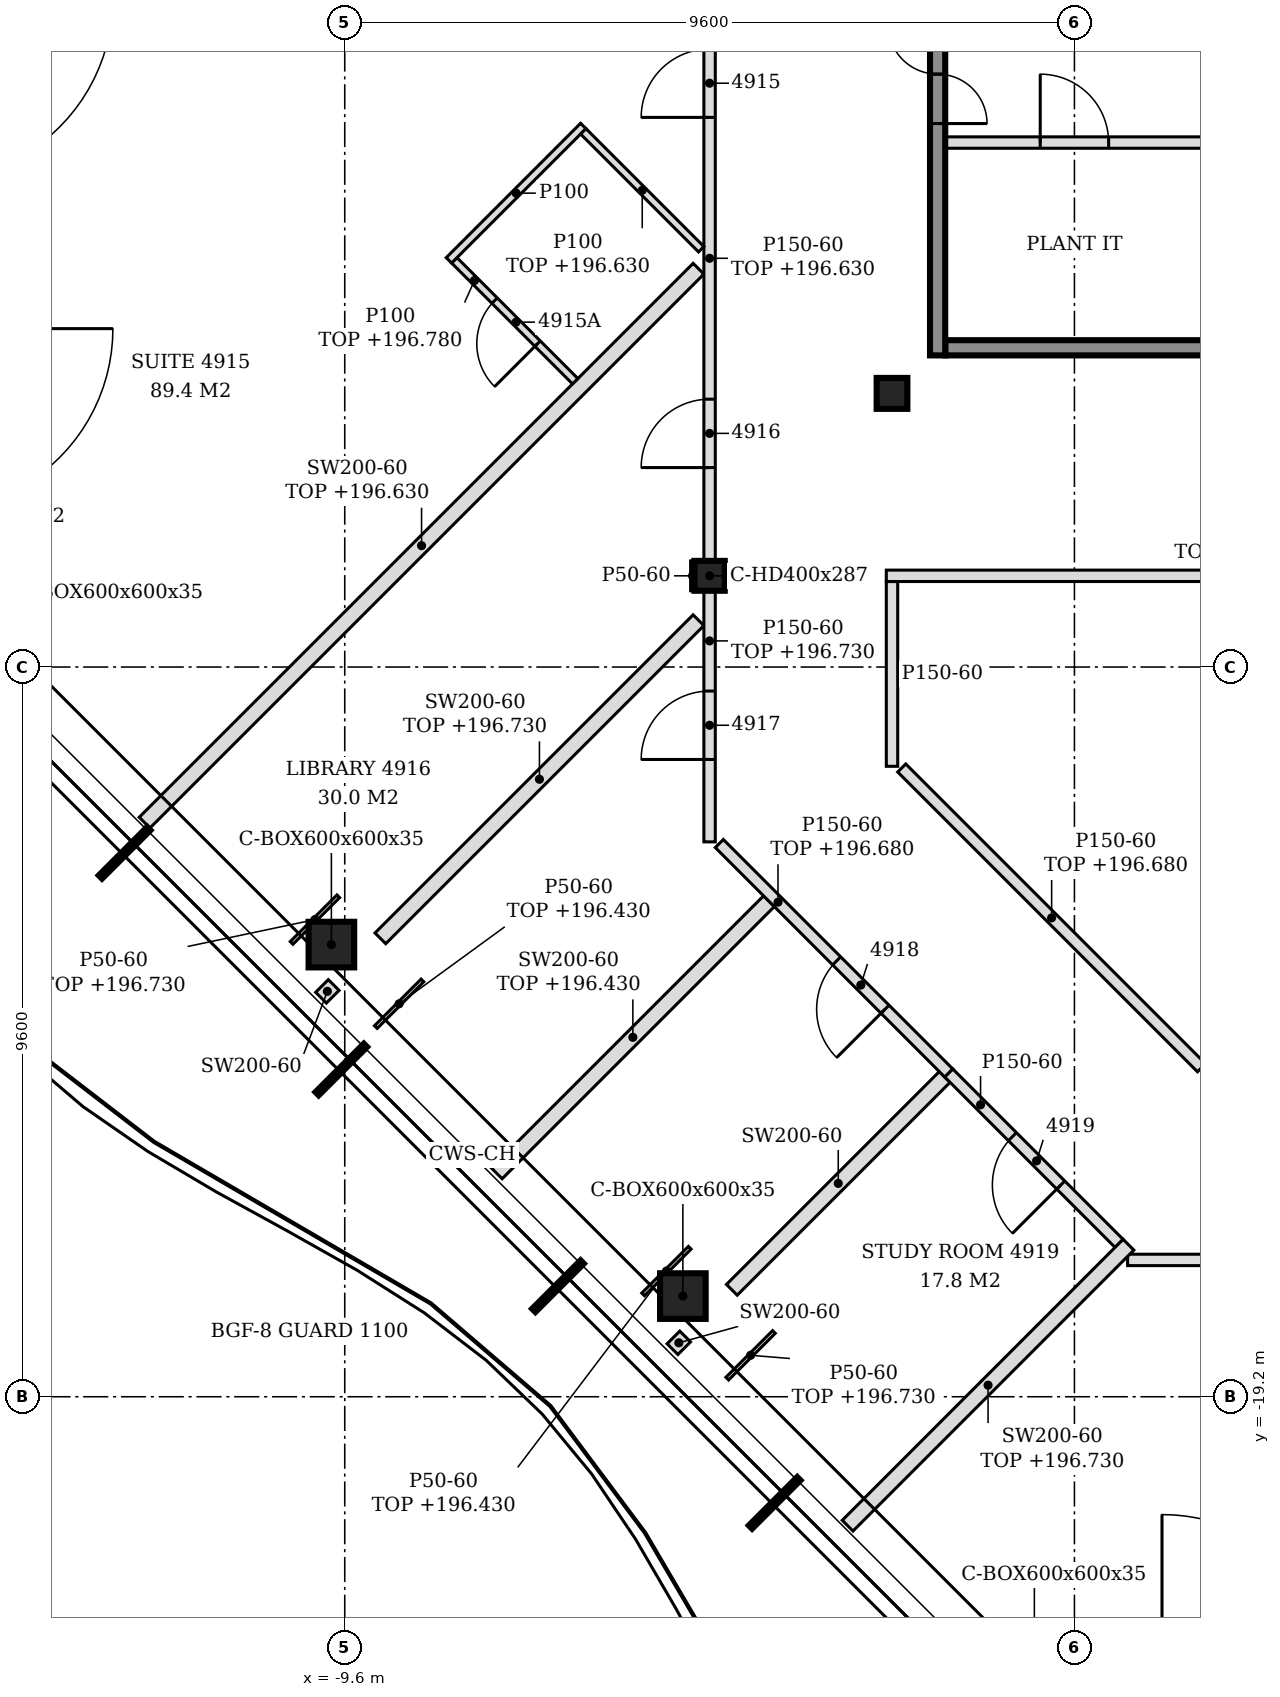
"""IFC4 building model, lengths in metres.
Left out: names, types, materials, properties, quantities, classifications, styles, units other than length and angle.
Written with IfcOpenShell. Run it as: python <this file> out.ifc"""

import sys

from ifc_helpers import new_model, si_unit, direction, frame, frame_2d, origin, origin_2d, place, context, subcontext, project, spatial, polyline, rectangle, hollow_rectangle, i_section, outline, extrude, clip, halfspace, element, fill, save


model = new_model("IFC4")
c1 = context("Model", 3, precision=1e-05, world=origin(), true_north=direction((0.0, 1.0)))
c2 = subcontext(c1, "Body", "Model", "MODEL_VIEW")
j1 = project(units=[si_unit("LENGTHUNIT", "METRE"), si_unit("PLANEANGLEUNIT", "RADIAN")], contexts=[c1])
p1 = place(None, origin())
s1 = spatial("IfcSite", under=j1, at=p1, CompositionType="ELEMENT")
p2 = place(p1, origin())
s2 = spatial("IfcBuilding", under=s1, at=p2, CompositionType="ELEMENT")
p3 = place(p2, frame((0.0, 0.0, 193.8)))
s3 = spatial("IfcBuildingStorey", under=s2, at=p3, CompositionType="ELEMENT", Elevation=193.8)
for number, where, z_axis, x_axis in (
    (1, (-0.527, -22.5, -0.15), (0.183, -0.122, 0.976), (0.555, 0.832, 0.0)),
    (2, (-14.4, -8.627, -0.15), (0.183, -0.122, 0.976), (0.555, 0.832, 0.0)),
):
    element("IfcColumn", number, at=place(p3, frame(where, z_axis=z_axis, x_axis=x_axis)), inside=s3, PredefinedType="COLUMN", context=c2, shape_type="Clipping", body=[
        clip(clip(extrude(hollow_rectangle(XDim=0.6, YDim=0.6, WallThickness=0.035, at=origin_2d()), origin(), (0.0, 0.0, 1.0), 3.69), halfspace(frame((0.0, 0.0, 0.021), z_axis=(0.0, 0.0, 1.0), x_axis=(1.0, 0.0, 0.0)), True)), halfspace(frame((0.0, 0.0, 3.668), z_axis=(0.0, 0.0, 1.0), x_axis=(1.0, 0.0, 0.0)), False)),
    ])
for number, where, z_axis, x_axis in (
    (3, (-9.776, -13.251, -0.15), (0.183, -0.122, 0.976), (0.555, 0.832, 0.0)),
    (4, (-5.152, -17.876, -0.15), (0.183, -0.122, 0.976), (0.555, 0.832, 0.0)),
):
    element("IfcColumn", number, at=place(p3, frame(where, z_axis=z_axis, x_axis=x_axis)), inside=s3, PredefinedType="COLUMN", context=c2, shape_type="Clipping", body=[
        clip(clip(extrude(hollow_rectangle(XDim=0.6, YDim=0.6, WallThickness=0.035, at=origin_2d()), origin(), (0.0, 0.0, 1.0), 3.69), halfspace(frame((0.0, 0.0, 0.021), z_axis=(0.0, 0.0, 1.0), x_axis=(1.0, 0.0, 0.0)), True)), halfspace(frame((0.0, 0.0, 3.668), z_axis=(0.0, 0.0, 1.0), x_axis=(1.0, 0.0, 0.0)), False)),
    ])
p4 = place(p3, frame((-4.8, -8.4, -0.15), z_axis=(0.0, 0.0, 1.0), x_axis=(1.0, 0.0, 0.0)))
e5 = element("IfcColumn", 5, at=p4, inside=s3, PredefinedType="COLUMN", context=c2, shape_type="SweptSolid", body=[
    extrude(i_section(OverallWidth=0.399, OverallDepth=0.393, WebThickness=0.023, FlangeThickness=0.037, FilletRadius=0.015, at=origin_2d()), origin(), (0.0, 0.0, 1.0), 3.6),
])
p5 = place(p3, frame((-2.4, -6.0, -0.15), z_axis=(0.0, 0.0, 1.0), x_axis=(1.0, 0.0, 0.0)))
e6 = element("IfcColumn", 6, at=p5, inside=s3, PredefinedType="COLUMN", context=c2, shape_type="SweptSolid", body=[
    extrude(i_section(OverallWidth=0.404, OverallDepth=0.407, WebThickness=0.027, FlangeThickness=0.044, FilletRadius=0.015, at=origin_2d()), origin(), (0.0, 0.0, 1.0), 3.6),
])
p6 = place(p3, frame((-1.7, -5.4, 0.0), z_axis=(0.0, 0.0, 1.0), x_axis=(1.0, 0.0, 0.0)))
e7 = element("IfcWall", 7, at=p6, inside=s3, PredefinedType="SOLIDWALL", context=c2, shape_type="SweptSolid", body=[
    extrude(rectangle(XDim=7.9, YDim=0.2, at=frame_2d((3.95, 0.0))), origin(), (0.0, 0.0, 1.0), 3.45),
])
p7 = place(p3, frame((-1.7, -2.7, 0.0), z_axis=(0.0, 0.0, 1.0), x_axis=(1.0, 0.0, 0.0)))
e8 = element("IfcWall", 8, at=p7, inside=s3, PredefinedType="PARTITIONING", context=c2, shape_type="SweptSolid", body=[
    extrude(rectangle(XDim=7.825, YDim=0.15, at=frame_2d((3.913, 0.0))), origin(), (0.0, 0.0, 1.0), 3.45),
])
p8 = place(p7, frame((1.25, 0.0, 0.0)))
e9 = element("IfcOpeningElement", 9, at=p8, cuts=e8, PredefinedType="OPENING", context=c2, shape_type="SweptSolid", body=[
    extrude(rectangle(XDim=0.9, YDim=2.1, at=frame_2d((0.45, 1.05))), frame((0.0, 0.085, 0.0), z_axis=(0.0, -1.0, 0.0), x_axis=(1.0, 0.0, 0.0)), (0.0, 0.0, 1.0), 0.17),
])
p9 = place(p7, frame((5.25, 0.0, 0.0)))
e10 = element("IfcOpeningElement", 10, at=p9, cuts=e8, PredefinedType="OPENING", context=c2, shape_type="SweptSolid", body=[
    extrude(rectangle(XDim=0.9, YDim=2.1, at=frame_2d((0.45, 1.05))), frame((0.0, 0.085, 0.0), z_axis=(0.0, -1.0, 0.0), x_axis=(1.0, 0.0, 0.0)), (0.0, 0.0, 1.0), 0.17),
])
p10 = place(p3, frame((-1.8, -5.5, 0.0), z_axis=(0.0, 0.0, 1.0), x_axis=(0.0, 1.0, 0.0)))
e11 = element("IfcWall", 11, at=p10, inside=s3, PredefinedType="SOLIDWALL", context=c2, shape_type="SweptSolid", body=[
    extrude(rectangle(XDim=15.8, YDim=0.2, at=frame_2d((7.9, 0.0))), origin(), (0.0, 0.0, 1.0), 3.45),
])
p11 = place(p10, frame((3.05, 0.0, 0.0)))
e12 = element("IfcOpeningElement", 12, at=p11, cuts=e11, PredefinedType="OPENING", context=c2, shape_type="SweptSolid", body=[
    extrude(rectangle(XDim=1.3, YDim=2.1, at=frame_2d((0.65, 1.05))), frame((0.0, 0.11, 0.0), z_axis=(0.0, -1.0, 0.0), x_axis=(1.0, 0.0, 0.0)), (0.0, 0.0, 1.0), 0.22),
])
p12 = place(p10, frame((11.45, 0.0, 0.0)))
e13 = element("IfcOpeningElement", 13, at=p12, cuts=e11, PredefinedType="OPENING", context=c2, shape_type="SweptSolid", body=[
    extrude(rectangle(XDim=1.3, YDim=2.1, at=frame_2d((0.65, 1.05))), frame((0.0, 0.11, 0.0), z_axis=(0.0, -1.0, 0.0), x_axis=(1.0, 0.0, 0.0)), (0.0, 0.0, 1.0), 0.22),
])
p13 = place(p3, frame((-2.984, -20.896, 0.0), z_axis=(0.0, 0.0, 1.0), x_axis=(0.707013347416, 0.707200202612, 0.0)))
e14 = element("IfcWall", 14, at=p13, inside=s3, PredefinedType="PARTITIONING", context=c2, shape_type="SweptSolid", body=[
    extrude(rectangle(XDim=5.226, YDim=0.2, at=frame_2d((2.613, 0.0))), origin(), (0.0, 0.0, 1.0), 2.93),
])
p14 = place(p3, frame((-5.288, -18.574, 0.0), z_axis=(0.0, 0.0, 1.0), x_axis=(0.707106781187, 0.707106781187, 0.0)))
e15 = element("IfcWall", 15, at=p14, inside=s3, PredefinedType="PARTITIONING", context=c2, shape_type="SweptSolid", body=[
    extrude(rectangle(XDim=0.235, YDim=0.2, at=frame_2d((0.118, 0.0))), origin(), (0.0, 0.0, 1.0), 3.45),
])
p15 = place(p3, frame((-4.507, -17.793, 0.0), z_axis=(0.0, 0.0, 1.0), x_axis=(0.707106781187, 0.707106781187, 0.0)))
e16 = element("IfcWall", 16, at=p15, inside=s3, PredefinedType="PARTITIONING", context=c2, shape_type="SweptSolid", body=[
    extrude(rectangle(XDim=3.96, YDim=0.2, at=frame_2d((1.98, 0.0))), origin(), (0.0, 0.0, 1.0), 3.45),
])
p16 = place(p3, frame((0.699, -17.4, 0.0), z_axis=(0.0, 0.0, 1.0), x_axis=(1.0, 0.0, 0.0)))
e17 = element("IfcWall", 17, at=p16, inside=s3, PredefinedType="PARTITIONING", context=c2, shape_type="SweptSolid", body=[
    extrude(outline(polyline([(0.0, 0.0), (24.822, 0.0), (24.822, 3.45), (18.651, 3.45), (18.649, 2.73), (18.351, 2.73), (18.349, 3.45), (6.651, 3.45), (6.649, 2.73), (6.351, 2.73), (6.349, 3.45), (0.0, 3.45), (0.0, 0.0)])), frame((0.0, 0.075, 0.0), z_axis=(0.0, -1.0, 0.0), x_axis=(1.0, 0.0, 0.0)), (0.0, 0.0, 1.0), 0.15),
])
p17 = place(p16, frame((11.188, 0.0, 0.0)))
e18 = element("IfcOpeningElement", 18, at=p17, cuts=e17, PredefinedType="OPENING", context=c2, shape_type="SweptSolid", body=[
    extrude(rectangle(XDim=0.9, YDim=2.1, at=frame_2d((0.45, 1.05))), frame((0.0, 0.085, 0.0), z_axis=(0.0, -1.0, 0.0), x_axis=(1.0, 0.0, 0.0)), (0.0, 0.0, 1.0), 0.17),
])
p18 = place(p16, frame((2.635, 0.0, 0.0)))
e19 = element("IfcOpeningElement", 19, at=p18, cuts=e17, PredefinedType="OPENING", context=c2, shape_type="SweptSolid", body=[
    extrude(rectangle(XDim=0.9, YDim=2.1, at=frame_2d((0.45, 1.05))), frame((0.0, 0.085, 0.0), z_axis=(0.0, -1.0, 0.0), x_axis=(1.0, 0.0, 0.0)), (0.0, 0.0, 1.0), 0.17),
])
p19 = place(p3, frame((0.587, -17.182, 0.0), z_axis=(0.0, 0.0, 1.0), x_axis=(-0.706952760983, 0.707260767849, 0.0)))
e20 = element("IfcWall", 20, at=p19, inside=s3, PredefinedType="PARTITIONING", context=c2, shape_type="SweptSolid", body=[
    extrude(rectangle(XDim=3.171, YDim=0.15, at=frame_2d((1.585, 0.0))), origin(), (0.0, 0.0, 1.0), 3.45),
])
p20 = place(p19, frame((1.085, 0.0, 0.0)))
e21 = element("IfcOpeningElement", 21, at=p20, cuts=e20, PredefinedType="OPENING", context=c2, shape_type="SweptSolid", body=[
    extrude(rectangle(XDim=0.9, YDim=2.1, at=frame_2d((0.45, 1.05))), frame((0.0, 0.085, 0.0), z_axis=(0.0, -1.0, 0.0), x_axis=(1.0, 0.0, 0.0)), (0.0, 0.0, 1.0), 0.17),
])
p21 = place(p3, frame((-7.6, -16.262, 0.0), z_axis=(0.0, 0.0, 1.0), x_axis=(0.707106781187, 0.707106781187, 0.0)))
e22 = element("IfcWall", 22, at=p21, inside=s3, PredefinedType="PARTITIONING", context=c2, shape_type="SweptSolid", body=[
    extrude(rectangle(XDim=5.064, YDim=0.2, at=frame_2d((2.532, 0.0))), origin(), (0.0, 0.0, 1.0), 2.63),
])
p22 = place(p3, frame((-1.654, -14.94, 0.0), z_axis=(0.0, 0.0, 1.0), x_axis=(-0.707106781187, 0.707106781187, 0.0)))
e23 = element("IfcWall", 23, at=p22, inside=s3, PredefinedType="PARTITIONING", context=c2, shape_type="SweptSolid", body=[
    extrude(rectangle(XDim=4.268, YDim=0.15, at=frame_2d((2.134, 0.0))), origin(), (0.0, 0.0, 1.0), 2.88),
])
p23 = place(p22, frame((1.185, 0.0, 0.0)))
e24 = element("IfcOpeningElement", 24, at=p23, cuts=e23, PredefinedType="OPENING", context=c2, shape_type="SweptSolid", body=[
    extrude(rectangle(XDim=0.9, YDim=2.1, at=frame_2d((0.45, 1.05))), frame((0.0, 0.085, 0.0), z_axis=(0.0, -1.0, 0.0), x_axis=(1.0, 0.0, 0.0)), (0.0, 0.0, 1.0), 0.17),
])
p24 = place(p3, frame((1.672, -14.872, 0.0), z_axis=(0.0, 0.0, 1.0), x_axis=(-0.707106781187, 0.707106781187, 0.0)))
e25 = element("IfcWall", 25, at=p24, inside=s3, PredefinedType="PARTITIONING", context=c2, shape_type="SweptSolid", body=[
    extrude(rectangle(XDim=5.578, YDim=0.15, at=frame_2d((2.789, 0.0))), origin(), (0.0, 0.0, 1.0), 2.88),
])
p25 = place(p3, frame((-9.912, -13.95, 0.0), z_axis=(0.0, 0.0, 1.0), x_axis=(0.707106781187, 0.707106781187, 0.0)))
e26 = element("IfcWall", 26, at=p25, inside=s3, PredefinedType="PARTITIONING", context=c2, shape_type="SweptSolid", body=[
    extrude(rectangle(XDim=0.235, YDim=0.2, at=frame_2d((0.118, 0.0))), origin(), (0.0, 0.0, 1.0), 3.45),
])
p26 = place(p3, frame((-9.131, -13.169, 0.0), z_axis=(0.0, 0.0, 1.0), x_axis=(0.707086158914, 0.707127402857, 0.0)))
e27 = element("IfcWall", 27, at=p26, inside=s3, PredefinedType="PARTITIONING", context=c2, shape_type="SweptSolid", body=[
    extrude(rectangle(XDim=5.919, YDim=0.2, at=frame_2d((2.96, 0.0))), origin(), (0.0, 0.0, 1.0), 2.93),
])
p27 = place(p3, frame((-4.8, -11.9, 0.0), z_axis=(0.0, 0.0, 1.0), x_axis=(0.0, 1.0, 0.0)))
e28 = element("IfcWall", 28, at=p27, inside=s3, PredefinedType="PARTITIONING", context=c2, shape_type="SweptSolid", body=[
    extrude(rectangle(XDim=3.304, YDim=0.15, at=frame_2d((1.652, 0.0))), origin(), (0.0, 0.0, 1.0), 2.93),
])
p28 = place(p27, frame((1.084, 0.0, 0.0)))
e29 = element("IfcOpeningElement", 29, at=p28, cuts=e28, PredefinedType="OPENING", context=c2, shape_type="SweptSolid", body=[
    extrude(rectangle(XDim=0.9, YDim=2.1, at=frame_2d((0.45, 1.05))), frame((0.0, 0.085, 0.0), z_axis=(0.0, -1.0, 0.0), x_axis=(1.0, 0.0, 0.0)), (0.0, 0.0, 1.0), 0.17),
])
p29 = place(p3, frame((-12.233, -11.647, 0.0), z_axis=(0.0, 0.0, 1.0), x_axis=(0.707094936157, 0.707118626017, 0.0)))
e30 = element("IfcWall", 30, at=p29, inside=s3, PredefinedType="PARTITIONING", context=c2, shape_type="SweptSolid", body=[
    extrude(rectangle(XDim=10.306, YDim=0.2, at=frame_2d((5.153, 0.0))), origin(), (0.0, 0.0, 1.0), 2.83),
])
p30 = place(p3, frame((-2.4, -10.906, 0.0), z_axis=(0.0, 0.0, 1.0), x_axis=(0.0, 1.0, 0.0)))
e31 = element("IfcWall", 31, at=p30, inside=s3, PredefinedType="PARTITIONING", context=c2, shape_type="SweptSolid", body=[
    extrude(outline(polyline([(0.0, 0.0), (2.431, 0.0), (2.431, 2.83), (2.356, 2.83), (2.354, 3.45), (0.0, 3.45), (0.0, 0.0)])), frame((0.0, 0.075, 0.0), z_axis=(0.0, -1.0, 0.0), x_axis=(1.0, 0.0, 0.0)), (0.0, 0.0, 1.0), 0.15),
])
p31 = place(p3, frame((-2.475, -8.4, 0.0), z_axis=(0.0, 0.0, 1.0), x_axis=(1.0, 0.0, 0.0)))
e32 = element("IfcWall", 32, at=p31, inside=s3, PredefinedType="PARTITIONING", context=c2, shape_type="SweptSolid", body=[
    extrude(rectangle(XDim=9.476, YDim=0.15, at=frame_2d((4.738, 0.0))), origin(), (0.0, 0.0, 1.0), 2.83),
])
p32 = place(p3, frame((-4.8, -8.204, 0.0), z_axis=(0.0, 0.0, 1.0), x_axis=(0.0, 1.0, 0.0)))
e33 = element("IfcWall", 33, at=p32, inside=s3, PredefinedType="PARTITIONING", context=c2, shape_type="SweptSolid", body=[
    extrude(rectangle(XDim=10.407, YDim=0.15, at=frame_2d((5.204, 0.0))), origin(), (0.0, 0.0, 1.0), 2.83),
])
p33 = place(p32, frame((9.022, 0.0, 0.0)))
e34 = element("IfcOpeningElement", 34, at=p33, cuts=e33, PredefinedType="OPENING", context=c2, shape_type="SweptSolid", body=[
    extrude(rectangle(XDim=0.9, YDim=2.1, at=frame_2d((0.45, 1.05))), frame((0.0, 0.085, 0.0), z_axis=(0.0, -1.0, 0.0), x_axis=(1.0, 0.0, 0.0)), (0.0, 0.0, 1.0), 0.17),
])
p34 = place(p32, frame((5.834, 0.0, 0.0)))
e35 = element("IfcOpeningElement", 35, at=p34, cuts=e33, PredefinedType="OPENING", context=c2, shape_type="SweptSolid", body=[
    extrude(rectangle(XDim=0.9, YDim=2.1, at=frame_2d((0.45, 1.05))), frame((0.0, 0.085, 0.0), z_axis=(0.0, -1.0, 0.0), x_axis=(1.0, 0.0, 0.0)), (0.0, 0.0, 1.0), 0.17),
])
p35 = place(p32, frame((1.228, 0.0, 0.0)))
e36 = element("IfcOpeningElement", 36, at=p35, cuts=e33, PredefinedType="OPENING", context=c2, shape_type="SweptSolid", body=[
    extrude(rectangle(XDim=0.9, YDim=2.1, at=frame_2d((0.45, 1.05))), frame((0.0, 0.085, 0.0), z_axis=(0.0, -1.0, 0.0), x_axis=(1.0, 0.0, 0.0)), (0.0, 0.0, 1.0), 0.17),
])
p36 = place(p3, frame((-6.568, -5.84, 0.0), z_axis=(0.0, 0.0, 1.0), x_axis=(-0.70716103421, 0.707052524, 0.0)))
e37 = element("IfcWall", 37, at=p36, inside=s3, PredefinedType="PARTITIONING", context=c2, shape_type="SweptSolid", body=[
    extrude(rectangle(XDim=2.25, YDim=0.1, at=frame_2d((1.125, 0.0))), origin(), (0.0, 0.0, 1.0), 2.98),
])
p37 = place(p36, frame((0.7, 0.0, 0.0)))
e38 = element("IfcOpeningElement", 38, at=p37, cuts=e37, PredefinedType="OPENING", context=c2, shape_type="SweptSolid", body=[
    extrude(rectangle(XDim=0.8, YDim=2.1, at=frame_2d((0.4, 1.05))), frame((0.0, 0.06, 0.0), z_axis=(0.0, -1.0, 0.0), x_axis=(1.0, 0.0, 0.0)), (0.0, 0.0, 1.0), 0.12),
])
p38 = place(p3, frame((-8.229, -4.25, 0.0), z_axis=(0.0, 0.0, 1.0), x_axis=(0.707106781187, 0.707106781187, 0.0)))
e39 = element("IfcWall", 39, at=p38, inside=s3, PredefinedType="PARTITIONING", context=c2, shape_type="SweptSolid", body=[
    extrude(rectangle(XDim=2.5, YDim=0.1, at=frame_2d((1.25, 0.0))), origin(), (0.0, 0.0, 1.0), 3.45),
])
p39 = place(p3, frame((-4.91, -4.104, 0.0), z_axis=(0.0, 0.0, 1.0), x_axis=(-0.707106781187, 0.707106781187, 0.0)))
e40 = element("IfcWall", 40, at=p39, inside=s3, PredefinedType="PARTITIONING", context=c2, shape_type="SweptSolid", body=[
    extrude(rectangle(XDim=2.194, YDim=0.1, at=frame_2d((1.097, 0.0))), origin(), (0.0, 0.0, 1.0), 2.83),
])
p40 = place(p3, frame((-4.567, -18.961, 0.0), z_axis=(0.0, 0.0, 1.0), x_axis=(0.707106781187, 0.707106781187, 0.0)))
e41 = element("IfcWall", 41, at=p40, inside=s3, PredefinedType="PARTITIONING", context=c2, shape_type="SweptSolid", body=[
    extrude(rectangle(XDim=0.868, YDim=0.05, at=frame_2d((0.434, 0.0))), origin(), (0.0, 0.0, 1.0), 2.93),
])
p41 = place(p3, frame((-5.675, -17.854, 0.0), z_axis=(0.0, 0.0, 1.0), x_axis=(0.707247373047, 0.706966161367, 0.0)))
e42 = element("IfcWall", 42, at=p41, inside=s3, PredefinedType="PARTITIONING", context=c2, shape_type="SweptSolid", body=[
    extrude(rectangle(XDim=0.868, YDim=0.05, at=frame_2d((0.434, 0.0))), origin(), (0.0, 0.0, 1.0), 2.63),
])
p42 = place(p3, frame((-10.299, -13.229, 0.0), z_axis=(0.0, 0.0, 1.0), x_axis=(0.707106781187, 0.707106781187, 0.0)))
e43 = element("IfcWall", 43, at=p42, inside=s3, PredefinedType="PARTITIONING", context=c2, shape_type="SweptSolid", body=[
    extrude(rectangle(XDim=0.868, YDim=0.05, at=frame_2d((0.434, 0.0))), origin(), (0.0, 0.0, 1.0), 2.93),
])
p43 = place(p3, frame((-9.191, -14.337, 0.0), z_axis=(0.0, 0.0, 1.0), x_axis=(0.707247373047, 0.706966161367, 0.0)))
e44 = element("IfcWall", 44, at=p43, inside=s3, PredefinedType="PARTITIONING", context=c2, shape_type="SweptSolid", body=[
    extrude(rectangle(XDim=0.868, YDim=0.05, at=frame_2d((0.434, 0.0))), origin(), (0.0, 0.0, 1.0), 2.63),
])
p44 = place(p3, frame((-5.024, -8.596, 0.0), z_axis=(0.0, 0.0, 1.0), x_axis=(0.0, 1.0, 0.0)))
e45 = element("IfcWall", 45, at=p44, inside=s3, PredefinedType="PARTITIONING", context=c2, shape_type="SweptSolid", body=[
    extrude(rectangle(XDim=0.393, YDim=0.05, at=frame_2d((0.196, 0.0))), origin(), (0.0, 0.0, 1.0), 3.45),
])
p45 = place(p11, origin())
e46 = element("IfcDoor", 46, at=p45, inside=s3, OperationType="DOUBLE_DOOR_SINGLE_SWING", PredefinedType="DOOR", context=c2, shape_type="SweptSolid", body=[
    extrude(rectangle(XDim=1.3, YDim=2.1, at=frame_2d((0.65, 1.05))), frame((0.0, 0.025, 0.0), z_axis=(0.0, -1.0, 0.0), x_axis=(1.0, 0.0, 0.0)), (0.0, 0.0, 1.0), 0.05),
])
fill(e12, e46)
p46 = place(p8, origin())
e47 = element("IfcDoor", 47, at=p46, inside=s3, OperationType="SINGLE_SWING_LEFT", PredefinedType="DOOR", context=c2, shape_type="SweptSolid", body=[
    extrude(rectangle(XDim=0.9, YDim=2.1, at=frame_2d((0.45, 1.05))), frame((0.0, 0.025, 0.0), z_axis=(0.0, -1.0, 0.0), x_axis=(1.0, 0.0, 0.0)), (0.0, 0.0, 1.0), 0.05),
])
fill(e9, e47)
p47 = place(p34, origin())
e48 = element("IfcDoor", 48, at=p47, inside=s3, OperationType="SINGLE_SWING_LEFT", PredefinedType="DOOR", context=c2, shape_type="SweptSolid", body=[
    extrude(rectangle(XDim=0.9, YDim=2.1, at=frame_2d((0.45, 1.05))), frame((0.0, 0.025, 0.0), z_axis=(0.0, -1.0, 0.0), x_axis=(1.0, 0.0, 0.0)), (0.0, 0.0, 1.0), 0.05),
])
fill(e35, e48)
p48 = place(p37, origin())
e49 = element("IfcDoor", 49, at=p48, inside=s3, OperationType="SINGLE_SWING_LEFT", PredefinedType="DOOR", context=c2, shape_type="SweptSolid", body=[
    extrude(rectangle(XDim=0.8, YDim=2.1, at=frame_2d((0.4, 1.05))), frame((0.0, 0.025, 0.0), z_axis=(0.0, -1.0, 0.0), x_axis=(1.0, 0.0, 0.0)), (0.0, 0.0, 1.0), 0.05),
])
fill(e38, e49)
p49 = place(p35, origin())
e50 = element("IfcDoor", 50, at=p49, inside=s3, OperationType="SINGLE_SWING_LEFT", PredefinedType="DOOR", context=c2, shape_type="SweptSolid", body=[
    extrude(rectangle(XDim=0.9, YDim=2.1, at=frame_2d((0.45, 1.05))), frame((0.0, 0.025, 0.0), z_axis=(0.0, -1.0, 0.0), x_axis=(1.0, 0.0, 0.0)), (0.0, 0.0, 1.0), 0.05),
])
fill(e36, e50)
p50 = place(p28, origin())
e51 = element("IfcDoor", 51, at=p50, inside=s3, OperationType="SINGLE_SWING_LEFT", PredefinedType="DOOR", context=c2, shape_type="SweptSolid", body=[
    extrude(rectangle(XDim=0.9, YDim=2.1, at=frame_2d((0.45, 1.05))), frame((0.0, 0.025, 0.0), z_axis=(0.0, -1.0, 0.0), x_axis=(1.0, 0.0, 0.0)), (0.0, 0.0, 1.0), 0.05),
])
fill(e29, e51)
p51 = place(p23, origin())
e52 = element("IfcDoor", 52, at=p51, inside=s3, OperationType="SINGLE_SWING_LEFT", PredefinedType="DOOR", context=c2, shape_type="SweptSolid", body=[
    extrude(rectangle(XDim=0.9, YDim=2.1, at=frame_2d((0.45, 1.05))), frame((0.0, 0.025, 0.0), z_axis=(0.0, -1.0, 0.0), x_axis=(1.0, 0.0, 0.0)), (0.0, 0.0, 1.0), 0.05),
])
fill(e24, e52)
p52 = place(p20, origin())
e53 = element("IfcDoor", 53, at=p52, inside=s3, OperationType="SINGLE_SWING_LEFT", PredefinedType="DOOR", context=c2, shape_type="SweptSolid", body=[
    extrude(rectangle(XDim=0.9, YDim=2.1, at=frame_2d((0.45, 1.05))), frame((0.0, 0.025, 0.0), z_axis=(0.0, -1.0, 0.0), x_axis=(1.0, 0.0, 0.0)), (0.0, 0.0, 1.0), 0.05),
])
fill(e21, e53)
save(model, sys.argv[1])
